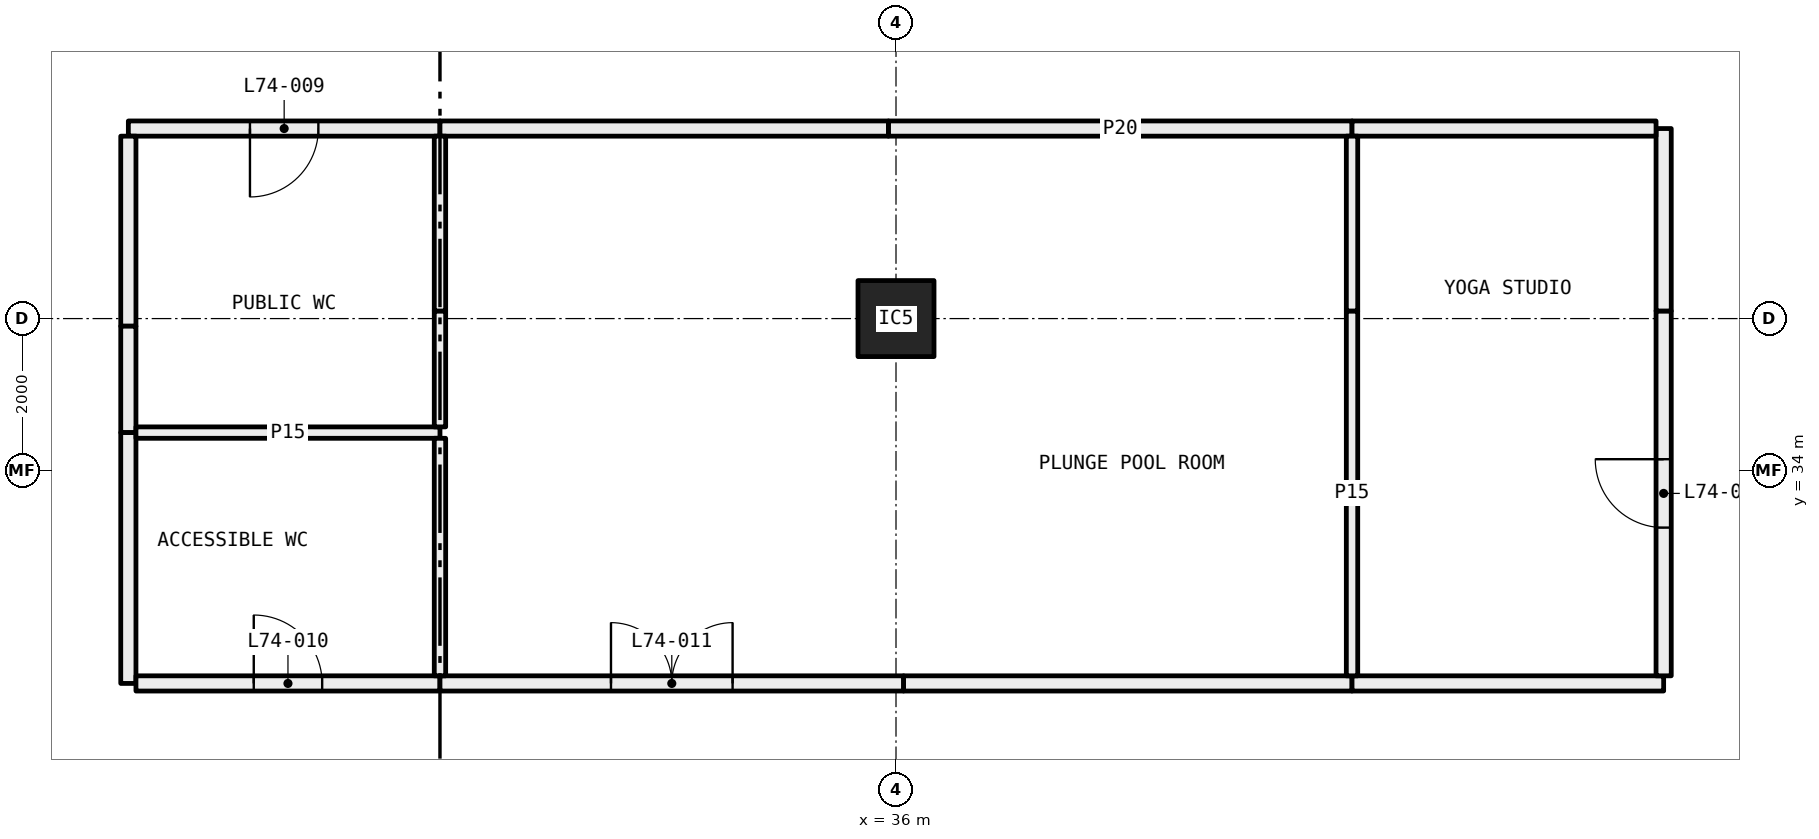
"""IFC4 building model, lengths in metres.
Left out: names, types, materials, properties, quantities, classifications, styles, units other than length and angle.
Written with IfcOpenShell. Run it as: python <this file> out.ifc"""

import sys

from ifc_helpers import new_model, si_unit, direction, frame, frame_2d, origin, origin_2d, place, context, subcontext, project, spatial, rectangle, hollow_rectangle, extrude, element, fill, save


model = new_model("IFC4")
c1 = context("Model", 3, precision=1e-05, world=origin(), true_north=direction((0.0, 1.0)))
c2 = subcontext(c1, "Body", "Model", "MODEL_VIEW")
j1 = project(units=[si_unit("LENGTHUNIT", "METRE"), si_unit("PLANEANGLEUNIT", "RADIAN")], contexts=[c1])
p1 = place(None, origin())
s1 = spatial("IfcSite", under=j1, at=p1, CompositionType="ELEMENT")
p2 = place(p1, origin())
s2 = spatial("IfcBuilding", under=s1, at=p2, CompositionType="ELEMENT")
p3 = place(p2, frame((0.0, 0.0, 273.15)))
s3 = spatial("IfcBuildingStorey", under=s2, at=p3, CompositionType="ELEMENT", Elevation=273.15)
p4 = place(p3, frame((36.0, 36.0, 0.0), z_axis=(0.0, 0.0, 1.0), x_axis=(1.0, 0.0, 0.0)))
e1 = element("IfcColumn", 1, at=p4, inside=s3, PredefinedType="COLUMN", context=c2, shape_type="SweptSolid", body=[
    extrude(hollow_rectangle(XDim=1.0, YDim=1.0, WallThickness=0.04, at=origin_2d()), origin(), (0.0, 0.0, 1.0), 4.4),
])
p5 = place(p3, frame((30.0, 38.5, 0.0), z_axis=(0.0, 0.0, 1.0), x_axis=(-1.0, 0.0, 0.0)))
e2 = element("IfcWall", 2, at=p5, inside=s3, PredefinedType="PARTITIONING", context=c2, shape_type="SweptSolid", body=[
    extrude(rectangle(XDim=4.1, YDim=0.2, at=frame_2d((2.05, 0.0))), origin(), (0.0, 0.0, 1.0), 4.4),
])
p6 = place(p5, frame((1.6, 0.0, 0.0)))
e3 = element("IfcOpeningElement", 3, at=p6, cuts=e2, PredefinedType="OPENING", context=c2, shape_type="SweptSolid", body=[
    extrude(rectangle(XDim=0.9, YDim=2.1, at=frame_2d((0.45, 1.05))), frame((0.0, 0.11, 0.0), z_axis=(0.0, -1.0, 0.0), x_axis=(1.0, 0.0, 0.0)), (0.0, 0.0, 1.0), 0.22),
])
p7 = place(p3, frame((25.9, 38.4, 0.0), z_axis=(0.0, 0.0, 1.0), x_axis=(0.0, -1.0, 0.0)))
e4 = element("IfcWall", 4, at=p7, inside=s3, PredefinedType="PARTITIONING", context=c2, shape_type="SweptSolid", body=[
    extrude(rectangle(XDim=2.5, YDim=0.2, at=frame_2d((1.25, 0.0))), origin(), (0.0, 0.0, 1.0), 3.8),
])
p8 = place(p3, frame((25.9, 35.9, 0.0), z_axis=(0.0, 0.0, 1.0), x_axis=(0.0, -1.0, 0.0)))
e5 = element("IfcWall", 5, at=p8, inside=s3, PredefinedType="PARTITIONING", context=c2, shape_type="SweptSolid", body=[
    extrude(rectangle(XDim=1.4, YDim=0.2, at=frame_2d((0.7, 0.0))), origin(), (0.0, 0.0, 1.0), 4.4),
])
p9 = place(p3, frame((25.9, 34.5, 0.0), z_axis=(0.0, 0.0, 1.0), x_axis=(0.0, -1.0, 0.0)))
e6 = element("IfcWall", 6, at=p9, inside=s3, PredefinedType="PARTITIONING", context=c2, shape_type="SweptSolid", body=[
    extrude(rectangle(XDim=3.3, YDim=0.2, at=frame_2d((1.65, 0.0))), origin(), (0.0, 0.0, 1.0), 4.4),
])
p10 = place(p3, frame((26.0, 31.2, 0.0), z_axis=(0.0, 0.0, 1.0), x_axis=(1.0, 0.0, 0.0)))
e7 = element("IfcWall", 7, at=p10, inside=s3, PredefinedType="PARTITIONING", context=c2, shape_type="SweptSolid", body=[
    extrude(rectangle(XDim=4.0, YDim=0.2, at=frame_2d((2.0, 0.0))), origin(), (0.0, 0.0, 1.0), 4.4),
])
p11 = place(p10, frame((1.55, 0.0, 0.0)))
e8 = element("IfcOpeningElement", 8, at=p11, cuts=e7, PredefinedType="OPENING", context=c2, shape_type="SweptSolid", body=[
    extrude(rectangle(XDim=0.9, YDim=2.1, at=frame_2d((0.45, 1.05))), frame((0.0, 0.11, 0.0), z_axis=(0.0, -1.0, 0.0), x_axis=(1.0, 0.0, 0.0)), (0.0, 0.0, 1.0), 0.22),
])
p12 = place(p3, frame((30.0, 31.2, 0.0), z_axis=(0.0, 0.0, 1.0), x_axis=(1.0, 0.0, 0.0)))
e9 = element("IfcWall", 9, at=p12, inside=s3, PredefinedType="PARTITIONING", context=c2, shape_type="SweptSolid", body=[
    extrude(rectangle(XDim=6.1, YDim=0.2, at=frame_2d((3.05, 0.0))), origin(), (0.0, 0.0, 1.0), 3.8),
])
p13 = place(p12, frame((2.25, 0.0, 0.0)))
e10 = element("IfcOpeningElement", 10, at=p13, cuts=e9, PredefinedType="OPENING", context=c2, shape_type="SweptSolid", body=[
    extrude(rectangle(XDim=1.6, YDim=2.1, at=frame_2d((0.8, 1.05))), frame((0.0, 0.11, 0.0), z_axis=(0.0, -1.0, 0.0), x_axis=(1.0, 0.0, 0.0)), (0.0, 0.0, 1.0), 0.22),
])
p14 = place(p3, frame((36.1, 31.2, 0.0), z_axis=(0.0, 0.0, 1.0), x_axis=(1.0, 0.0, 0.0)))
e11 = element("IfcWall", 11, at=p14, inside=s3, PredefinedType="PARTITIONING", context=c2, shape_type="SweptSolid", body=[
    extrude(rectangle(XDim=5.9, YDim=0.2, at=frame_2d((2.95, 0.0))), origin(), (0.0, 0.0, 1.0), 4.4),
])
p15 = place(p3, frame((42.0, 38.5, 0.0), z_axis=(0.0, 0.0, 1.0), x_axis=(-1.0, 0.0, 0.0)))
e12 = element("IfcWall", 12, at=p15, inside=s3, PredefinedType="PARTITIONING", context=c2, shape_type="SweptSolid", body=[
    extrude(rectangle(XDim=6.1, YDim=0.2, at=frame_2d((3.05, 0.0))), origin(), (0.0, 0.0, 1.0), 3.8),
])
p16 = place(p3, frame((35.9, 38.5, 0.0), z_axis=(0.0, 0.0, 1.0), x_axis=(-1.0, 0.0, 0.0)))
e13 = element("IfcWall", 13, at=p16, inside=s3, PredefinedType="PARTITIONING", context=c2, shape_type="SweptSolid", body=[
    extrude(rectangle(XDim=5.9, YDim=0.2, at=frame_2d((2.95, 0.0))), origin(), (0.0, 0.0, 1.0), 4.4),
])
p17 = place(p3, frame((42.0, 31.2, 0.0), z_axis=(0.0, 0.0, 1.0), x_axis=(1.0, 0.0, 0.0)))
e14 = element("IfcWall", 14, at=p17, inside=s3, PredefinedType="PARTITIONING", context=c2, shape_type="SweptSolid", body=[
    extrude(rectangle(XDim=4.1, YDim=0.2, at=frame_2d((2.05, 0.0))), origin(), (0.0, 0.0, 1.0), 4.4),
])
p18 = place(p3, frame((46.1, 31.3, 0.0), z_axis=(0.0, 0.0, 1.0), x_axis=(0.0, 1.0, 0.0)))
e15 = element("IfcWall", 15, at=p18, inside=s3, PredefinedType="PARTITIONING", context=c2, shape_type="SweptSolid", body=[
    extrude(rectangle(XDim=4.8, YDim=0.2, at=frame_2d((2.4, 0.0))), origin(), (0.0, 0.0, 1.0), 3.8),
])
p19 = place(p18, frame((1.95, 0.0, 0.0)))
e16 = element("IfcOpeningElement", 16, at=p19, cuts=e15, PredefinedType="OPENING", context=c2, shape_type="SweptSolid", body=[
    extrude(rectangle(XDim=0.9, YDim=2.1, at=frame_2d((0.45, 1.05))), frame((0.0, 0.11, 0.0), z_axis=(0.0, -1.0, 0.0), x_axis=(1.0, 0.0, 0.0)), (0.0, 0.0, 1.0), 0.22),
])
p20 = place(p3, frame((46.1, 36.1, 0.0), z_axis=(0.0, 0.0, 1.0), x_axis=(0.0, 1.0, 0.0)))
e17 = element("IfcWall", 17, at=p20, inside=s3, PredefinedType="PARTITIONING", context=c2, shape_type="SweptSolid", body=[
    extrude(rectangle(XDim=2.4, YDim=0.2, at=frame_2d((1.2, 0.0))), origin(), (0.0, 0.0, 1.0), 4.4),
])
p21 = place(p3, frame((46.0, 38.5, 0.0), z_axis=(0.0, 0.0, 1.0), x_axis=(-1.0, 0.0, 0.0)))
e18 = element("IfcWall", 18, at=p21, inside=s3, PredefinedType="PARTITIONING", context=c2, shape_type="SweptSolid", body=[
    extrude(rectangle(XDim=4.0, YDim=0.2, at=frame_2d((2.0, 0.0))), origin(), (0.0, 0.0, 1.0), 4.4),
])
p22 = place(p3, frame((26.0, 34.5, 0.0), z_axis=(0.0, 0.0, 1.0), x_axis=(1.0, 0.0, 0.0)))
e19 = element("IfcWall", 19, at=p22, inside=s3, PredefinedType="PARTITIONING", context=c2, shape_type="SweptSolid", body=[
    extrude(rectangle(XDim=4.0, YDim=0.15, at=frame_2d((2.0, 0.0))), origin(), (0.0, 0.0, 1.0), 4.4),
])
p23 = place(p3, frame((30.0, 34.575, 0.0), z_axis=(0.0, 0.0, 1.0), x_axis=(0.0, 1.0, 0.0)))
e20 = element("IfcWall", 20, at=p23, inside=s3, PredefinedType="PARTITIONING", context=c2, shape_type="SweptSolid", body=[
    extrude(rectangle(XDim=1.525, YDim=0.15, at=frame_2d((0.763, 0.0))), origin(), (0.0, 0.0, 1.0), 3.8),
])
p24 = place(p3, frame((30.0, 36.1, 0.0), z_axis=(0.0, 0.0, 1.0), x_axis=(0.0, 1.0, 0.0)))
e21 = element("IfcWall", 21, at=p24, inside=s3, PredefinedType="PARTITIONING", context=c2, shape_type="SweptSolid", body=[
    extrude(rectangle(XDim=2.3, YDim=0.15, at=frame_2d((1.15, 0.0))), origin(), (0.0, 0.0, 1.0), 4.4),
])
p25 = place(p3, frame((30.0, 31.3, 0.0), z_axis=(0.0, 0.0, 1.0), x_axis=(0.0, 1.0, 0.0)))
e22 = element("IfcWall", 22, at=p25, inside=s3, PredefinedType="PARTITIONING", context=c2, shape_type="SweptSolid", body=[
    extrude(rectangle(XDim=3.125, YDim=0.15, at=frame_2d((1.562, 0.0))), origin(), (0.0, 0.0, 1.0), 4.4),
])
p26 = place(p3, frame((42.0, 31.3, 0.0), z_axis=(0.0, 0.0, 1.0), x_axis=(0.0, 1.0, 0.0)))
e23 = element("IfcWall", 23, at=p26, inside=s3, PredefinedType="PARTITIONING", context=c2, shape_type="SweptSolid", body=[
    extrude(rectangle(XDim=4.8, YDim=0.15, at=frame_2d((2.4, 0.0))), origin(), (0.0, 0.0, 1.0), 3.8),
])
p27 = place(p3, frame((42.0, 36.1, 0.0), z_axis=(0.0, 0.0, 1.0), x_axis=(0.0, 1.0, 0.0)))
e24 = element("IfcWall", 24, at=p27, inside=s3, PredefinedType="PARTITIONING", context=c2, shape_type="SweptSolid", body=[
    extrude(rectangle(XDim=2.3, YDim=0.15, at=frame_2d((1.15, 0.0))), origin(), (0.0, 0.0, 1.0), 4.4),
])
p28 = place(p6, origin())
e25 = element("IfcDoor", 25, at=p28, inside=s3, OperationType="SINGLE_SWING_LEFT", PredefinedType="DOOR", context=c2, shape_type="SweptSolid", body=[
    extrude(rectangle(XDim=0.9, YDim=2.1, at=frame_2d((0.45, 1.05))), frame((0.0, 0.025, 0.0), z_axis=(0.0, -1.0, 0.0), x_axis=(1.0, 0.0, 0.0)), (0.0, 0.0, 1.0), 0.05),
])
fill(e3, e25)
p29 = place(p11, origin())
e26 = element("IfcDoor", 26, at=p29, inside=s3, OperationType="SINGLE_SWING_RIGHT", PredefinedType="DOOR", context=c2, shape_type="SweptSolid", body=[
    extrude(rectangle(XDim=0.9, YDim=2.1, at=frame_2d((0.45, 1.05))), frame((0.0, 0.025, 0.0), z_axis=(0.0, -1.0, 0.0), x_axis=(1.0, 0.0, 0.0)), (0.0, 0.0, 1.0), 0.05),
])
fill(e8, e26)
p30 = place(p13, origin())
e27 = element("IfcDoor", 27, at=p30, inside=s3, OperationType="DOUBLE_DOOR_SINGLE_SWING", PredefinedType="DOOR", context=c2, shape_type="SweptSolid", body=[
    extrude(rectangle(XDim=1.6, YDim=2.1, at=frame_2d((0.8, 1.05))), frame((0.0, 0.025, 0.0), z_axis=(0.0, -1.0, 0.0), x_axis=(1.0, 0.0, 0.0)), (0.0, 0.0, 1.0), 0.05),
])
fill(e10, e27)
p31 = place(p19, origin())
e28 = element("IfcDoor", 28, at=p31, inside=s3, OperationType="SINGLE_SWING_LEFT", PredefinedType="DOOR", context=c2, shape_type="SweptSolid", body=[
    extrude(rectangle(XDim=0.9, YDim=2.1, at=frame_2d((0.45, 1.05))), frame((0.0, 0.025, 0.0), z_axis=(0.0, -1.0, 0.0), x_axis=(1.0, 0.0, 0.0)), (0.0, 0.0, 1.0), 0.05),
])
fill(e16, e28)
save(model, sys.argv[1])
